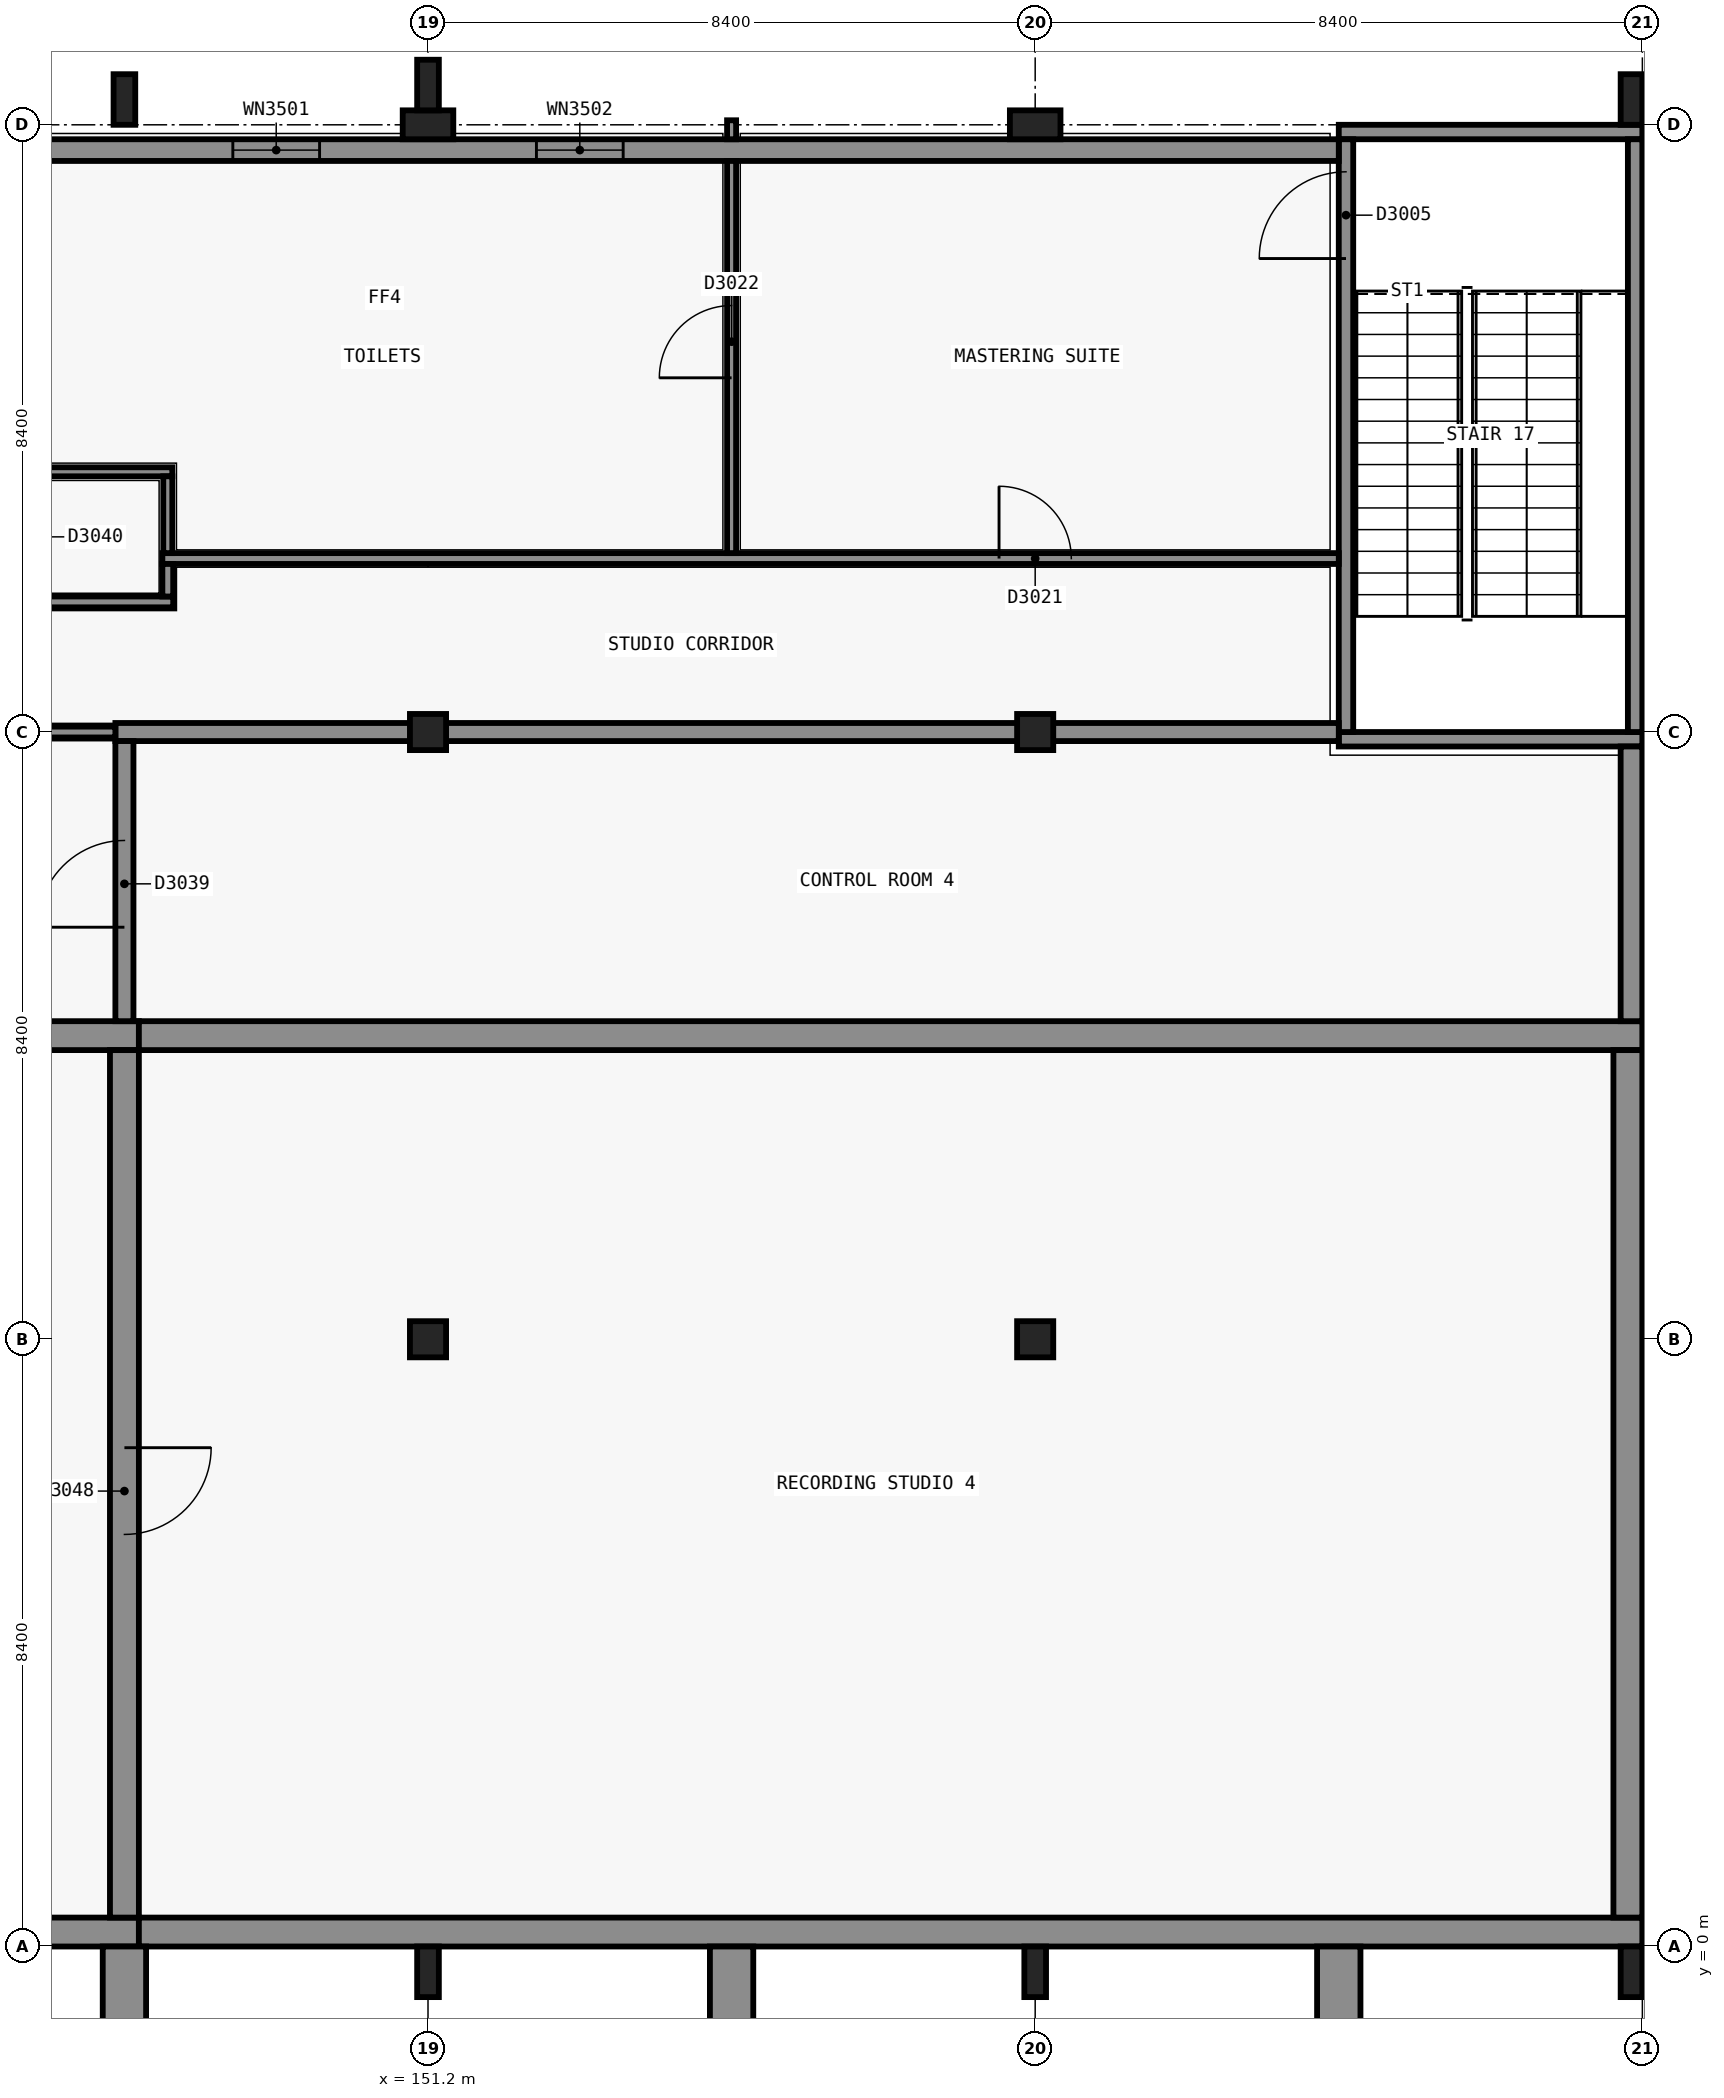
"""IFC4 building model, lengths in metres.
Left out: names, types, materials, properties, quantities, classifications, styles, units other than length and angle.
Written with IfcOpenShell. Run it as: python <this file> out.ifc"""

import sys

from ifc_helpers import new_model, si_unit, direction, frame, frame_2d, origin, origin_2d, place, context, subcontext, project, spatial, rectangle, extrude, element, fill, save


model = new_model("IFC4")
c1 = context("Model", 3, precision=1e-05, world=origin(), true_north=direction((0.0, 1.0)))
c2 = subcontext(c1, "Body", "Model", "MODEL_VIEW")
j1 = project(units=[si_unit("LENGTHUNIT", "METRE"), si_unit("PLANEANGLEUNIT", "RADIAN")], contexts=[c1])
p1 = place(None, origin())
s1 = spatial("IfcSite", under=j1, at=p1, CompositionType="ELEMENT")
p2 = place(p1, origin())
s2 = spatial("IfcBuilding", under=s1, at=p2, CompositionType="ELEMENT")
p3 = place(p2, frame((0.0, 0.0, 15.0)))
s3 = spatial("IfcBuildingStorey", under=s2, at=p3, CompositionType="ELEMENT", Elevation=15.0)
for number, where, z_axis, x_axis in (
    (1, (168.0, 16.7, 0.0), (0.0, 0.0, 1.0), (-1.0, 0.0, 0.0)),
    (2, (163.8, 25.1, 0.0), (0.0, 0.0, 1.0), (1.0, 0.0, 0.0)),
):
    element("IfcWall", number, at=place(p3, frame(where, z_axis=z_axis, x_axis=x_axis)), inside=s3, PredefinedType="SHEAR", context=c2, shape_type="SweptSolid", body=[
        extrude(rectangle(XDim=4.199, YDim=0.2, at=frame_2d((2.1, 0.0))), origin(), (0.0, 0.0, 1.0), 4.8),
    ])
p4 = place(p3, frame((163.9, 16.8, 0.0), z_axis=(0.0, 0.0, 1.0), x_axis=(0.0, 1.0, 0.0)))
e3 = element("IfcWall", 3, at=p4, inside=s3, PredefinedType="SHEAR", context=c2, shape_type="SweptSolid", body=[
    extrude(rectangle(XDim=8.2, YDim=0.2, at=frame_2d((4.1, 0.0))), origin(), (0.0, 0.0, 1.0), 4.8),
])
p5 = place(p4, frame((6.55, 0.0, 0.0)))
e4 = element("IfcOpeningElement", 4, at=p5, cuts=e3, PredefinedType="OPENING", context=c2, shape_type="SweptSolid", body=[
    extrude(rectangle(XDim=1.2, YDim=2.1, at=frame_2d((0.6, 1.05))), frame((0.0, 0.11, 0.0), z_axis=(0.0, -1.0, 0.0), x_axis=(1.0, 0.0, 0.0)), (0.0, 0.0, 1.0), 0.22),
])
p6 = place(p3, frame((167.9, 25.0, 0.0), z_axis=(0.0, 0.0, 1.0), x_axis=(0.0, -1.0, 0.0)))
e5 = element("IfcWall", 5, at=p6, inside=s3, PredefinedType="SHEAR", context=c2, shape_type="SweptSolid", body=[
    extrude(rectangle(XDim=8.2, YDim=0.2, at=frame_2d((4.1, 0.0))), origin(), (0.0, 0.0, 1.0), 4.8),
])
p7 = place(p3, frame((147.2, 0.2, 0.0), z_axis=(0.0, 0.0, 1.0), x_axis=(-1.0, 0.0, 0.0)))
e6 = element("IfcWall", 6, at=p7, inside=s3, PredefinedType="SHEAR", context=c2, shape_type="SweptSolid", body=[
    extrude(rectangle(XDim=21.2, YDim=0.4, at=frame_2d((10.6, 0.0))), origin(), (0.0, 0.0, 1.0), 4.8),
])
p8 = place(p3, frame((126.0, 12.6, 0.0), z_axis=(0.0, 0.0, 1.0), x_axis=(1.0, 0.0, 0.0)))
e7 = element("IfcWall", 7, at=p8, inside=s3, PredefinedType="SHEAR", context=c2, shape_type="SweptSolid", body=[
    extrude(rectangle(XDim=21.2, YDim=0.4, at=frame_2d((10.6, 0.0))), origin(), (0.0, 0.0, 1.0), 4.8),
])
p9 = place(p8, frame((14.1, 0.0, 0.0)))
e8 = element("IfcOpeningElement", 8, at=p9, cuts=e7, PredefinedType="OPENING", context=c2, shape_type="SweptSolid", body=[
    extrude(rectangle(XDim=1.2, YDim=2.1, at=frame_2d((0.6, 1.05))), frame((0.0, 0.21, 0.0), z_axis=(0.0, -1.0, 0.0), x_axis=(1.0, 0.0, 0.0)), (0.0, 0.0, 1.0), 0.42),
])
p10 = place(p3, frame((147.0, 12.4, 0.0), z_axis=(0.0, 0.0, 1.0), x_axis=(0.0, -1.0, 0.0)))
e9 = element("IfcWall", 9, at=p10, inside=s3, PredefinedType="SHEAR", context=c2, shape_type="SweptSolid", body=[
    extrude(rectangle(XDim=12.0, YDim=0.4, at=frame_2d((6.0, 0.0))), origin(), (0.0, 0.0, 1.0), 4.8),
])
p11 = place(p10, frame((5.5, 0.0, 0.0)))
e10 = element("IfcOpeningElement", 10, at=p11, cuts=e9, PredefinedType="OPENING", context=c2, shape_type="SweptSolid", body=[
    extrude(rectangle(XDim=1.2, YDim=2.1, at=frame_2d((0.6, 1.05))), frame((0.0, 0.21, 0.0), z_axis=(0.0, -1.0, 0.0), x_axis=(1.0, 0.0, 0.0)), (0.0, 0.0, 1.0), 0.42),
])
for number, where, z_axis, x_axis in (
    (11, (168.0, 0.2, 0.0), (0.0, 0.0, 1.0), (-1.0, 0.0, 0.0)),
    (12, (147.2, 12.6, 0.0), (0.0, 0.0, 1.0), (1.0, 0.0, 0.0)),
):
    element("IfcWall", number, at=place(p3, frame(where, z_axis=z_axis, x_axis=x_axis)), inside=s3, PredefinedType="SHEAR", context=c2, shape_type="SweptSolid", body=[
        extrude(rectangle(XDim=20.8, YDim=0.4, at=frame_2d((10.4, 0.0))), origin(), (0.0, 0.0, 1.0), 4.8),
    ])
p12 = place(p3, frame((167.8, 12.4, 0.0), z_axis=(0.0, 0.0, 1.0), x_axis=(0.0, -1.0, 0.0)))
e13 = element("IfcWall", 13, at=p12, inside=s3, PredefinedType="SHEAR", context=c2, shape_type="SweptSolid", body=[
    extrude(rectangle(XDim=12.0, YDim=0.4, at=frame_2d((6.0, 0.0))), origin(), (0.0, 0.0, 1.0), 4.8),
])
p13 = place(p3, frame((167.85, 16.6, 0.0), z_axis=(0.0, 0.0, 1.0), x_axis=(0.0, -1.0, 0.0)))
e14 = element("IfcWall", 14, at=p13, inside=s3, PredefinedType="SOLIDWALL", context=c2, shape_type="SweptSolid", body=[
    extrude(rectangle(XDim=3.8, YDim=0.3, at=frame_2d((1.9, 0.0))), origin(), (0.0, 0.0, 1.0), 4.8),
])
for number, where, z_axis, x_axis in (
    (15, (151.2, 8.4, 0.0), (0.0, 0.0, 1.0), (1.0, 0.0, 0.0)),
    (16, (151.2, 16.8, 0.0), (0.0, 0.0, 1.0), (1.0, 0.0, 0.0)),
):
    element("IfcColumn", number, at=place(p3, frame(where, z_axis=z_axis, x_axis=x_axis)), inside=s3, PredefinedType="COLUMN", context=c2, shape_type="SweptSolid", body=[
        extrude(rectangle(XDim=0.5, YDim=0.5, at=origin_2d()), origin(), (0.0, 0.0, 1.0), 4.8),
    ])
p14 = place(p3, frame((151.2, 25.2, 0.0), z_axis=(0.0, 0.0, 1.0), x_axis=(1.0, 0.0, 0.0)))
e17 = element("IfcColumn", 17, at=p14, inside=s3, PredefinedType="COLUMN", context=c2, shape_type="SweptSolid", body=[
    extrude(rectangle(XDim=0.7, YDim=0.4, at=origin_2d()), origin(), (0.0, 0.0, 1.0), 4.8),
])
for number, where, z_axis, x_axis in (
    (18, (159.6, 8.4, 0.0), (0.0, 0.0, 1.0), (1.0, 0.0, 0.0)),
    (19, (159.6, 16.8, 0.0), (0.0, 0.0, 1.0), (1.0, 0.0, 0.0)),
):
    element("IfcColumn", number, at=place(p3, frame(where, z_axis=z_axis, x_axis=x_axis)), inside=s3, PredefinedType="COLUMN", context=c2, shape_type="SweptSolid", body=[
        extrude(rectangle(XDim=0.5, YDim=0.5, at=origin_2d()), origin(), (0.0, 0.0, 1.0), 4.8),
    ])
p15 = place(p3, frame((159.6, 25.2, 0.0), z_axis=(0.0, 0.0, 1.0), x_axis=(1.0, 0.0, 0.0)))
e20 = element("IfcColumn", 20, at=p15, inside=s3, PredefinedType="COLUMN", context=c2, shape_type="SweptSolid", body=[
    extrude(rectangle(XDim=0.7, YDim=0.4, at=origin_2d()), origin(), (0.0, 0.0, 1.0), 4.8),
])
for number, where, z_axis, x_axis in (
    (21, (151.2, -0.35, 0.0), (0.0, 0.0, 1.0), (1.0, 0.0, 0.0)),
    (22, (159.6, -0.35, 0.0), (0.0, 0.0, 1.0), (1.0, 0.0, 0.0)),
    (23, (167.85, -0.35, 0.0), (0.0, 0.0, 1.0), (1.0, 0.0, 0.0)),
):
    element("IfcColumn", number, at=place(p3, frame(where, z_axis=z_axis, x_axis=x_axis)), inside=s3, PredefinedType="PILASTER", context=c2, shape_type="SweptSolid", body=[
        extrude(rectangle(XDim=0.3, YDim=0.7, at=origin_2d()), origin(), (0.0, 0.0, 1.0), 4.8),
    ])
p16 = place(p3, frame((145.8, 24.85, 0.0), z_axis=(0.0, 0.0, 1.0), x_axis=(1.0, 0.0, 0.0)))
e24 = element("IfcWall", 24, at=p16, inside=s3, PredefinedType="SOLIDWALL", context=c2, shape_type="SweptSolid", body=[
    extrude(rectangle(XDim=18.0, YDim=0.3, at=frame_2d((9.0, 0.0))), origin(), (0.0, 0.0, 1.0), 4.5),
])
p17 = place(p16, frame((2.7, 0.0, 1.5)))
e25 = element("IfcOpeningElement", 25, at=p17, cuts=e24, PredefinedType="OPENING", context=c2, shape_type="SweptSolid", body=[
    extrude(rectangle(XDim=1.2, YDim=0.9, at=frame_2d((0.6, 0.45))), frame((0.0, 0.16, 0.0), z_axis=(0.0, -1.0, 0.0), x_axis=(1.0, 0.0, 0.0)), (0.0, 0.0, 1.0), 0.32),
])
p18 = place(p16, frame((6.9, 0.0, 1.5)))
e26 = element("IfcOpeningElement", 26, at=p18, cuts=e24, PredefinedType="OPENING", context=c2, shape_type="SweptSolid", body=[
    extrude(rectangle(XDim=1.2, YDim=0.9, at=frame_2d((0.6, 0.45))), frame((0.0, 0.16, 0.0), z_axis=(0.0, -1.0, 0.0), x_axis=(1.0, 0.0, 0.0)), (0.0, 0.0, 1.0), 0.32),
])
for number, where, z_axis, x_axis in (
    (27, (147.0, 25.55, 0.0), (0.0, 0.0, 1.0), (1.0, 0.0, 0.0)),
    (28, (151.2, 25.75, 0.0), (0.0, 0.0, 1.0), (1.0, 0.0, 0.0)),
    (29, (167.85, 25.55, 0.0), (0.0, 0.0, 1.0), (1.0, 0.0, 0.0)),
):
    element("IfcColumn", number, at=place(p3, frame(where, z_axis=z_axis, x_axis=x_axis)), inside=s3, PredefinedType="PILASTER", context=c2, shape_type="SweptSolid", body=[
        extrude(rectangle(XDim=0.3, YDim=0.7, at=origin_2d()), origin(), (0.0, 0.0, 1.0), 4.8),
    ])
for number, where, z_axis, x_axis in (
    (30, (147.0, 0.0, 0.0), (0.0, 0.0, 1.0), (0.0, -1.0, 0.0)),
    (31, (155.4, 0.0, 0.0), (0.0, 0.0, 1.0), (0.0, -1.0, 0.0)),
    (32, (163.8, 0.0, 0.0), (0.0, 0.0, 1.0), (0.0, -1.0, 0.0)),
):
    element("IfcWall", number, at=place(p3, frame(where, z_axis=z_axis, x_axis=x_axis)), inside=s3, PredefinedType="SOLIDWALL", context=c2, shape_type="SweptSolid", body=[
        extrude(rectangle(XDim=1.5, YDim=0.6, at=frame_2d((0.75, 0.0))), origin(), (0.0, 0.0, 1.0), 4.8),
    ])
p19 = place(p3, frame((146.875, 16.8, 0.0), z_axis=(0.0, 0.0, 1.0), x_axis=(1.0, 0.0, 0.0)))
e33 = element("IfcWall", 33, at=p19, inside=s3, PredefinedType="PARTITIONING", context=c2, shape_type="SweptSolid", body=[
    extrude(rectangle(XDim=16.925, YDim=0.25, at=frame_2d((8.462, 0.0))), origin(), (0.0, 0.0, 1.0), 3.7),
])
p20 = place(p3, frame((147.0, 12.8, 0.0), z_axis=(0.0, 0.0, 1.0), x_axis=(0.0, 1.0, 0.0)))
e34 = element("IfcWall", 34, at=p20, inside=s3, PredefinedType="PARTITIONING", context=c2, shape_type="SweptSolid", body=[
    extrude(rectangle(XDim=3.875, YDim=0.25, at=frame_2d((1.938, 0.0))), origin(), (0.0, 0.0, 1.0), 3.7),
])
p21 = place(p20, frame((1.3, 0.0, 0.0)))
e35 = element("IfcOpeningElement", 35, at=p21, cuts=e34, PredefinedType="OPENING", context=c2, shape_type="SweptSolid", body=[
    extrude(rectangle(XDim=1.2, YDim=2.1, at=frame_2d((0.6, 1.05))), frame((0.0, 0.135, 0.0), z_axis=(0.0, -1.0, 0.0), x_axis=(1.0, 0.0, 0.0)), (0.0, 0.0, 1.0), 0.27),
])
p22 = place(p3, frame((145.725, 16.8, 0.0), z_axis=(0.0, 0.0, 1.0), x_axis=(1.0, 0.0, 0.0)))
e36 = element("IfcWall", 36, at=p22, inside=s3, PredefinedType="PARTITIONING", context=c2, shape_type="SweptSolid", body=[
    extrude(rectangle(XDim=1.15, YDim=0.15, at=frame_2d((0.575, 0.0))), origin(), (0.0, 0.0, 1.0), 3.7),
])
p23 = place(p3, frame((145.725, 18.6, 0.0), z_axis=(0.0, 0.0, 1.0), x_axis=(1.0, 0.0, 0.0)))
e37 = element("IfcWall", 37, at=p23, inside=s3, PredefinedType="PARTITIONING", context=c2, shape_type="SweptSolid", body=[
    extrude(rectangle(XDim=1.95, YDim=0.15, at=frame_2d((0.975, 0.0))), origin(), (0.0, 0.0, 1.0), 3.9),
])
p24 = place(p3, frame((147.525, 19.2, 0.0), z_axis=(0.0, 0.0, 1.0), x_axis=(1.0, 0.0, 0.0)))
e38 = element("IfcWall", 38, at=p24, inside=s3, PredefinedType="PARTITIONING", context=c2, shape_type="SweptSolid", body=[
    extrude(rectangle(XDim=16.275, YDim=0.15, at=frame_2d((8.137, 0.0))), origin(), (0.0, 0.0, 1.0), 3.7),
])
p25 = place(p24, frame((11.575, 0.0, 0.0)))
e39 = element("IfcOpeningElement", 39, at=p25, cuts=e38, PredefinedType="OPENING", context=c2, shape_type="SweptSolid", body=[
    extrude(rectangle(XDim=1.0, YDim=2.1, at=frame_2d((0.5, 1.05))), frame((0.0, 0.085, 0.0), z_axis=(0.0, -1.0, 0.0), x_axis=(1.0, 0.0, 0.0)), (0.0, 0.0, 1.0), 0.17),
])
p26 = place(p3, frame((147.6, 18.675, 0.0), z_axis=(0.0, 0.0, 1.0), x_axis=(0.0, 1.0, 0.0)))
e40 = element("IfcWall", 40, at=p26, inside=s3, PredefinedType="PARTITIONING", context=c2, shape_type="SweptSolid", body=[
    extrude(rectangle(XDim=0.45, YDim=0.15, at=frame_2d((0.225, 0.0))), origin(), (0.0, 0.0, 1.0), 4.4),
])
p27 = place(p3, frame((145.875, 20.4, 0.0), z_axis=(0.0, 0.0, 1.0), x_axis=(1.0, 0.0, 0.0)))
e41 = element("IfcWall", 41, at=p27, inside=s3, PredefinedType="PARTITIONING", context=c2, shape_type="SweptSolid", body=[
    extrude(rectangle(XDim=1.788, YDim=0.125, at=frame_2d((0.894, 0.0))), origin(), (0.0, 0.0, 1.0), 3.9),
])
p28 = place(p3, frame((147.6, 19.275, 0.0), z_axis=(0.0, 0.0, 1.0), x_axis=(0.0, 1.0, 0.0)))
e42 = element("IfcWall", 42, at=p28, inside=s3, PredefinedType="PARTITIONING", context=c2, shape_type="SweptSolid", body=[
    extrude(rectangle(XDim=1.062, YDim=0.125, at=frame_2d((0.531, 0.0))), origin(), (0.0, 0.0, 1.0), 4.4),
])
p29 = place(p3, frame((155.4, 19.275, 0.0), z_axis=(0.0, 0.0, 1.0), x_axis=(0.0, 1.0, 0.0)))
e43 = element("IfcWall", 43, at=p29, inside=s3, PredefinedType="PARTITIONING", context=c2, shape_type="SweptSolid", body=[
    extrude(rectangle(XDim=5.425, YDim=0.125, at=frame_2d((2.712, 0.0))), origin(), (0.0, 0.0, 1.0), 3.7),
])
p30 = place(p29, frame((2.425, 0.0, 0.0)))
e44 = element("IfcOpeningElement", 44, at=p30, cuts=e43, PredefinedType="OPENING", context=c2, shape_type="SweptSolid", body=[
    extrude(rectangle(XDim=1.0, YDim=2.1, at=frame_2d((0.5, 1.05))), frame((0.0, 0.073, 0.0), z_axis=(0.0, -1.0, 0.0), x_axis=(1.0, 0.0, 0.0)), (0.0, 0.0, 1.0), 0.145),
])
p31 = place(p3, frame((155.4, 25.0, 0.0), z_axis=(0.0, 0.0, 1.0), x_axis=(0.0, 1.0, 0.0)))
e45 = element("IfcWall", 45, at=p31, inside=s3, PredefinedType="PARTITIONING", context=c2, shape_type="SweptSolid", body=[
    extrude(rectangle(XDim=0.262, YDim=0.125, at=frame_2d((0.131, 0.0))), origin(), (0.0, 0.0, 1.0), 3.7),
])
p32 = place(p17, origin())
e46 = element("IfcWindow", 46, at=p32, inside=s3, PartitioningType="SINGLE_PANEL", PredefinedType="WINDOW", context=c2, shape_type="SweptSolid", body=[
    extrude(rectangle(XDim=1.2, YDim=0.9, at=frame_2d((0.6, 0.45))), frame((0.0, 0.03, 0.0), z_axis=(0.0, -1.0, 0.0), x_axis=(1.0, 0.0, 0.0)), (0.0, 0.0, 1.0), 0.06),
])
fill(e25, e46)
p33 = place(p18, origin())
e47 = element("IfcWindow", 47, at=p33, inside=s3, PartitioningType="SINGLE_PANEL", PredefinedType="WINDOW", context=c2, shape_type="SweptSolid", body=[
    extrude(rectangle(XDim=1.2, YDim=0.9, at=frame_2d((0.6, 0.45))), frame((0.0, 0.03, 0.0), z_axis=(0.0, -1.0, 0.0), x_axis=(1.0, 0.0, 0.0)), (0.0, 0.0, 1.0), 0.06),
])
fill(e26, e47)
p34 = place(p5, origin())
e48 = element("IfcDoor", 48, at=p34, inside=s3, OperationType="SINGLE_SWING_RIGHT", PredefinedType="DOOR", context=c2, shape_type="SweptSolid", body=[
    extrude(rectangle(XDim=1.2, YDim=2.1, at=frame_2d((0.6, 1.05))), frame((0.0, 0.025, 0.0), z_axis=(0.0, -1.0, 0.0), x_axis=(1.0, 0.0, 0.0)), (0.0, 0.0, 1.0), 0.05),
])
fill(e4, e48)
p35 = place(p25, origin())
e49 = element("IfcDoor", 49, at=p35, inside=s3, OperationType="SINGLE_SWING_RIGHT", PredefinedType="DOOR", context=c2, shape_type="SweptSolid", body=[
    extrude(rectangle(XDim=1.0, YDim=2.1, at=frame_2d((0.5, 1.05))), frame((0.0, 0.025, 0.0), z_axis=(0.0, -1.0, 0.0), x_axis=(1.0, 0.0, 0.0)), (0.0, 0.0, 1.0), 0.05),
])
fill(e39, e49)
p36 = place(p30, origin())
e50 = element("IfcDoor", 50, at=p36, inside=s3, OperationType="SINGLE_SWING_RIGHT", PredefinedType="DOOR", context=c2, shape_type="SweptSolid", body=[
    extrude(rectangle(XDim=1.0, YDim=2.1, at=frame_2d((0.5, 1.05))), frame((0.0, 0.025, 0.0), z_axis=(0.0, -1.0, 0.0), x_axis=(1.0, 0.0, 0.0)), (0.0, 0.0, 1.0), 0.05),
])
fill(e44, e50)
p37 = place(p21, origin())
e51 = element("IfcDoor", 51, at=p37, inside=s3, OperationType="SINGLE_SWING_LEFT", PredefinedType="DOOR", context=c2, shape_type="SweptSolid", body=[
    extrude(rectangle(XDim=1.2, YDim=2.1, at=frame_2d((0.6, 1.05))), frame((0.0, 0.025, 0.0), z_axis=(0.0, -1.0, 0.0), x_axis=(1.0, 0.0, 0.0)), (0.0, 0.0, 1.0), 0.05),
])
fill(e35, e51)
p38 = place(p11, origin())
e52 = element("IfcDoor", 52, at=p38, inside=s3, OperationType="SINGLE_SWING_RIGHT", PredefinedType="DOOR", context=c2, shape_type="SweptSolid", body=[
    extrude(rectangle(XDim=1.2, YDim=2.1, at=frame_2d((0.6, 1.05))), frame((0.0, 0.025, 0.0), z_axis=(0.0, -1.0, 0.0), x_axis=(1.0, 0.0, 0.0)), (0.0, 0.0, 1.0), 0.05),
])
fill(e10, e52)
save(model, sys.argv[1])
